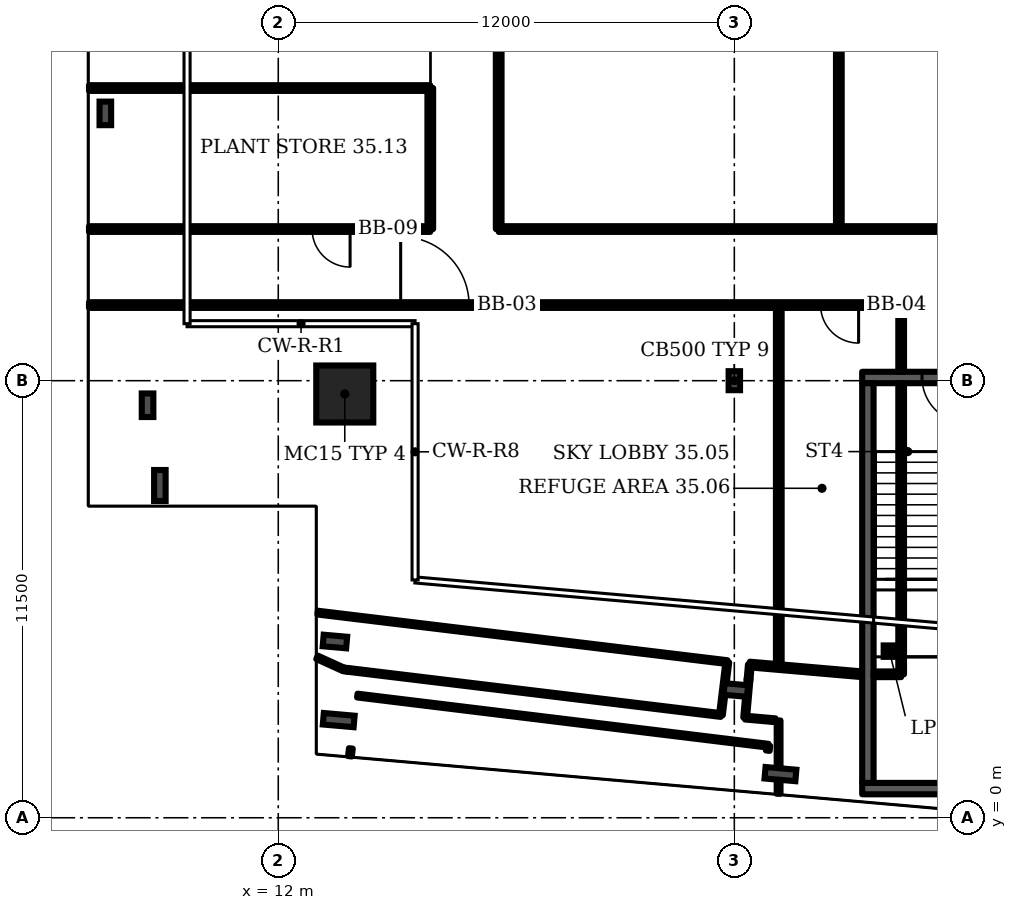
"""IFC4 building model, lengths in metres.
Left out: names, types, materials, properties, quantities, classifications, styles, units other than length and angle.
Written with IfcOpenShell. Run it as: python <this file> out.ifc"""

import sys

from ifc_helpers import new_model, si_unit, direction, frame, frame_2d, origin, origin_2d, place, context, subcontext, project, spatial, rectangle, i_section, extrude, element, fill, save


model = new_model("IFC4")
c1 = context("Model", 3, precision=1e-05, world=origin(), true_north=direction((0.0, 1.0)))
c2 = subcontext(c1, "Body", "Model", "MODEL_VIEW")
j1 = project(units=[si_unit("LENGTHUNIT", "METRE"), si_unit("PLANEANGLEUNIT", "RADIAN")], contexts=[c1])
p1 = place(None, origin())
s1 = spatial("IfcSite", under=j1, at=p1, CompositionType="ELEMENT")
p2 = place(p1, origin())
s2 = spatial("IfcBuilding", under=s1, at=p2, CompositionType="ELEMENT")
p3 = place(p2, frame((0.0, 0.0, 147.1)))
s3 = spatial("IfcBuildingStorey", under=s2, at=p3, CompositionType="ELEMENT", Elevation=147.1)
p4 = place(p3, frame((13.75, 11.15, 0.0), z_axis=(0.0, 0.0, 1.0), x_axis=(1.0, 0.0, 0.0)))
e1 = element("IfcColumn", 1, at=p4, inside=s3, PredefinedType="COLUMN", context=c2, shape_type="SweptSolid", body=[
    extrude(rectangle(XDim=1.5, YDim=1.5, at=origin_2d()), origin(), (0.0, 0.0, 1.0), 4.8),
])
for number, where, z_axis, x_axis in (
    (2, (13.491, 4.637, 0.0), (0.0, 0.0, 1.0), (-0.087, -0.996, 0.0)),
    (3, (24.039, 3.361, 0.0), (0.0, 0.0, 1.0), (-0.087, -0.996, 0.0)),
    (4, (7.45, 18.533, 0.0), (0.0, 0.0, 1.0), (-1.0, 0.0, 0.0)),
    (5, (8.561, 10.854, 0.0), (0.0, 0.0, 1.0), (-1.0, 0.0, 0.0)),
):
    element("IfcColumn", number, at=place(p3, frame(where, z_axis=z_axis, x_axis=x_axis)), inside=s3, PredefinedType="COLUMN", context=c2, shape_type="SweptSolid", body=[
        extrude(i_section(OverallWidth=0.305, OverallDepth=0.62, WebThickness=0.021, FlangeThickness=0.04, FilletRadius=0.027, at=origin_2d()), origin(), (0.0, 0.0, 1.0), 4.8),
    ])
p5 = place(p3, frame((24.0, 11.5, 0.0), z_axis=(0.0, 0.0, 1.0), x_axis=(1.0, 0.0, 0.0)))
e6 = element("IfcColumn", 6, at=p5, inside=s3, PredefinedType="COLUMN", context=c2, shape_type="SweptSolid", body=[
    extrude(i_section(OverallWidth=0.3, OverallDepth=0.5, WebThickness=0.014, FlangeThickness=0.028, FilletRadius=0.027, at=origin_2d()), origin(), (0.0, 0.0, 1.0), 4.8),
])
for number, where, z_axis, x_axis in (
    (7, (13.591, 2.569, 0.0), (0.0, 0.0, 1.0), (-0.087, -0.996, 0.0)),
    (8, (25.214, 1.149, 0.0), (0.0, 0.0, 1.0), (-0.087, -0.996, 0.0)),
    (9, (8.885, 8.743, 0.0), (0.0, 0.0, 1.0), (-1.0, 0.0, 0.0)),
):
    element("IfcColumn", number, at=place(p3, frame(where, z_axis=z_axis, x_axis=x_axis)), inside=s3, PredefinedType="COLUMN", context=c2, shape_type="SweptSolid", body=[
        extrude(i_section(OverallWidth=0.303, OverallDepth=0.814, WebThickness=0.021, FlangeThickness=0.04, FilletRadius=0.03, at=origin_2d()), origin(), (0.0, 0.0, 1.0), 4.8),
    ])
p6 = place(p3, frame((27.364, 11.584, 0.0), z_axis=(0.0, 0.0, 1.0), x_axis=(1.0, 0.0, 0.0)))
e10 = element("IfcWall", 10, at=p6, inside=s3, PredefinedType="SHEAR", context=c2, shape_type="SweptSolid", body=[
    extrude(rectangle(XDim=18.171, YDim=0.3, at=frame_2d((9.085, 0.0))), origin(), (0.0, 0.0, 1.0), 4.4),
])
p7 = place(p6, frame((1.575, 0.0, 0.0)))
e11 = element("IfcOpeningElement", 11, at=p7, cuts=e10, PredefinedType="OPENING", context=c2, shape_type="SweptSolid", body=[
    extrude(rectangle(XDim=1.2, YDim=2.1, at=frame_2d((0.6, 1.05))), frame((0.0, 0.16, 0.0), z_axis=(0.0, -1.0, 0.0), x_axis=(1.0, 0.0, 0.0)), (0.0, 0.0, 1.0), 0.32),
])
p8 = place(p3, frame((7.02, 13.49, 0.0), z_axis=(0.0, 0.0, 1.0), x_axis=(1.0, 0.0, 0.0)))
e12 = element("IfcWall", 12, at=p8, inside=s3, PredefinedType="PARTITIONING", context=c2, shape_type="SweptSolid", body=[
    extrude(rectangle(XDim=21.37, YDim=0.15, at=frame_2d((10.685, 0.0))), origin(), (0.0, 0.0, 1.0), 4.4),
])
p9 = place(p8, frame((8.201, 0.0, 0.0)))
e13 = element("IfcOpeningElement", 13, at=p9, cuts=e12, PredefinedType="OPENING", context=c2, shape_type="SweptSolid", body=[
    extrude(rectangle(XDim=1.8, YDim=2.1, at=frame_2d((0.9, 1.05))), frame((0.0, 0.085, 0.0), z_axis=(0.0, -1.0, 0.0), x_axis=(1.0, 0.0, 0.0)), (0.0, 0.0, 1.0), 0.17),
])
p10 = place(p8, frame((19.25, 0.0, 0.0)))
e14 = element("IfcOpeningElement", 14, at=p10, cuts=e12, PredefinedType="OPENING", context=c2, shape_type="SweptSolid", body=[
    extrude(rectangle(XDim=1.0, YDim=2.1, at=frame_2d((0.5, 1.05))), frame((0.0, 0.085, 0.0), z_axis=(0.0, -1.0, 0.0), x_axis=(1.0, 0.0, 0.0)), (0.0, 0.0, 1.0), 0.17),
])
p11 = place(p3, frame((7.02, 15.49, 0.0), z_axis=(0.0, 0.0, 1.0), x_axis=(1.0, 0.0, 0.0)))
e15 = element("IfcWall", 15, at=p11, inside=s3, PredefinedType="PARTITIONING", context=c2, shape_type="SweptSolid", body=[
    extrude(rectangle(XDim=8.98, YDim=0.15, at=frame_2d((4.49, 0.0))), origin(), (0.0, 0.0, 1.0), 4.4),
])
p12 = place(p11, frame((5.87, 0.0, 0.0)))
e16 = element("IfcOpeningElement", 16, at=p12, cuts=e15, PredefinedType="OPENING", context=c2, shape_type="SweptSolid", body=[
    extrude(rectangle(XDim=1.0, YDim=2.1, at=frame_2d((0.5, 1.05))), frame((0.0, 0.085, 0.0), z_axis=(0.0, -1.0, 0.0), x_axis=(1.0, 0.0, 0.0)), (0.0, 0.0, 1.0), 0.17),
])
p13 = place(p3, frame((7.02, 19.2, 0.0), z_axis=(0.0, 0.0, 1.0), x_axis=(1.0, 0.0, 0.0)))
e17 = element("IfcWall", 17, at=p13, inside=s3, PredefinedType="PARTITIONING", context=c2, shape_type="SweptSolid", body=[
    extrude(rectangle(XDim=8.98, YDim=0.15, at=frame_2d((4.49, 0.0))), origin(), (0.0, 0.0, 1.0), 4.4),
])
p14 = place(p3, frame((13.715, 3.905, 0.0), z_axis=(0.0, 0.0, 1.0), x_axis=(-0.910389, 0.413755, 0.0)))
e18 = element("IfcWall", 18, at=p14, inside=s3, PredefinedType="PARTITIONING", context=c2, shape_type="SweptSolid", body=[
    extrude(rectangle(XDim=0.763, YDim=0.1, at=frame_2d((0.381, 0.0))), origin(), (0.0, 0.0, 1.0), 4.4),
])
p15 = place(p3, frame((13.82, 3.89, 0.0), z_axis=(0.0, 0.0, 1.0), x_axis=(-0.989763, 0.14271, 0.0)))
e19 = element("IfcWall", 19, at=p15, inside=s3, PredefinedType="PARTITIONING", context=c2, shape_type="SweptSolid", body=[
    extrude(rectangle(XDim=0.106, YDim=0.1, at=frame_2d((0.053, 0.0))), origin(), (0.0, 0.0, 1.0), 4.4),
])
p16 = place(p3, frame((13.887, 1.617, 0.0), z_axis=(0.0, 0.0, 1.0), x_axis=(0.109791, 0.993959, 0.0)))
e20 = element("IfcWall", 20, at=p16, inside=s3, PredefinedType="PARTITIONING", context=c2, shape_type="SweptSolid", body=[
    extrude(rectangle(XDim=0.209, YDim=0.1, at=frame_2d((0.104, 0.0))), origin(), (0.0, 0.0, 1.0), 4.4),
])
p17 = place(p3, frame((16.0, 15.49, 0.0), z_axis=(0.0, 0.0, 1.0), x_axis=(0.0, 1.0, 0.0)))
e21 = element("IfcWall", 21, at=p17, inside=s3, PredefinedType="PARTITIONING", context=c2, shape_type="SweptSolid", body=[
    extrude(rectangle(XDim=3.71, YDim=0.15, at=frame_2d((1.855, 0.0))), origin(), (0.0, 0.0, 1.0), 4.4),
])
p18 = place(p3, frame((17.8, 15.49, 0.0), z_axis=(0.0, 0.0, 1.0), x_axis=(0.0, 1.0, 0.0)))
e22 = element("IfcWall", 22, at=p18, inside=s3, PredefinedType="PARTITIONING", context=c2, shape_type="SweptSolid", body=[
    extrude(rectangle(XDim=8.31, YDim=0.15, at=frame_2d((4.155, 0.0))), origin(), (0.0, 0.0, 1.0), 4.4),
])
p19 = place(p3, frame((17.8, 15.49, 0.0), z_axis=(0.0, 0.0, 1.0), x_axis=(1.0, 0.0, 0.0)))
e23 = element("IfcWall", 23, at=p19, inside=s3, PredefinedType="PARTITIONING", context=c2, shape_type="SweptSolid", body=[
    extrude(rectangle(XDim=32.39, YDim=0.15, at=frame_2d((16.195, 0.0))), origin(), (0.0, 0.0, 1.0), 4.4),
])
p20 = place(p3, frame((23.647, 2.703, 0.0), z_axis=(0.0, 0.0, 1.0), x_axis=(-0.99276, 0.120117, 0.0)))
e24 = element("IfcWall", 24, at=p20, inside=s3, PredefinedType="PARTITIONING", context=c2, shape_type="SweptSolid", body=[
    extrude(rectangle(XDim=9.896, YDim=0.1, at=frame_2d((4.948, 0.0))), origin(), (0.0, 0.0, 1.0), 4.4),
])
p21 = place(p3, frame((23.647, 2.703, 0.0), z_axis=(0.0, 0.0, 1.0), x_axis=(0.120149, 0.992755, 0.0)))
e25 = element("IfcWall", 25, at=p21, inside=s3, PredefinedType="PARTITIONING", context=c2, shape_type="SweptSolid", body=[
    extrude(rectangle(XDim=1.4, YDim=0.1, at=frame_2d((0.7, 0.0))), origin(), (0.0, 0.0, 1.0), 4.4),
])
p22 = place(p3, frame((23.815, 4.095, 0.0), z_axis=(0.0, 0.0, 1.0), x_axis=(-0.992778, 0.119977, 0.0)))
e26 = element("IfcWall", 26, at=p22, inside=s3, PredefinedType="PARTITIONING", context=c2, shape_type="SweptSolid", body=[
    extrude(rectangle(XDim=10.858, YDim=0.1, at=frame_2d((5.429, 0.0))), origin(), (0.0, 0.0, 1.0), 4.4),
])
p23 = place(p3, frame((24.285, 2.635, 0.0), z_axis=(0.0, 0.0, 1.0), x_axis=(0.08886, 0.996042, 0.0)))
e27 = element("IfcWall", 27, at=p23, inside=s3, PredefinedType="PARTITIONING", context=c2, shape_type="SweptSolid", body=[
    extrude(rectangle(XDim=1.025, YDim=0.1, at=frame_2d((0.512, 0.0))), origin(), (0.0, 0.0, 1.0), 4.4),
])
p24 = place(p3, frame((24.374, 3.632, 0.0), z_axis=(0.0, 0.0, 1.0), x_axis=(0.087129, 0.996195, 0.0)))
e28 = element("IfcWall", 28, at=p24, inside=s3, PredefinedType="PARTITIONING", context=c2, shape_type="SweptSolid", body=[
    extrude(rectangle(XDim=0.401, YDim=0.1, at=frame_2d((0.2, 0.0))), origin(), (0.0, 0.0, 1.0), 4.4),
])
p25 = place(p3, frame((24.88, 1.765, 0.0), z_axis=(0.0, 0.0, 1.0), x_axis=(0.115544, 0.993306, 0.0)))
e29 = element("IfcWall", 29, at=p25, inside=s3, PredefinedType="PARTITIONING", context=c2, shape_type="SweptSolid", body=[
    extrude(rectangle(XDim=0.131, YDim=0.1, at=frame_2d((0.065, 0.0))), origin(), (0.0, 0.0, 1.0), 4.4),
])
p26 = place(p3, frame((24.895, 1.895, 0.0), z_axis=(0.0, 0.0, 1.0), x_axis=(-0.992629, 0.12116, 0.0)))
e30 = element("IfcWall", 30, at=p26, inside=s3, PredefinedType="PARTITIONING", context=c2, shape_type="SweptSolid", body=[
    extrude(rectangle(XDim=10.895, YDim=0.1, at=frame_2d((5.448, 0.0))), origin(), (0.0, 0.0, 1.0), 4.4),
])
p27 = place(p3, frame((25.08, 2.565, 0.0), z_axis=(0.0, 0.0, 1.0), x_axis=(-0.996143, 0.087778, 0.0)))
e31 = element("IfcWall", 31, at=p27, inside=s3, PredefinedType="PARTITIONING", context=c2, shape_type="SweptSolid", body=[
    extrude(rectangle(XDim=0.798, YDim=0.1, at=frame_2d((0.399, 0.0))), origin(), (0.0, 0.0, 1.0), 4.4),
])
p28 = place(p3, frame((25.165, 0.631, 0.0), z_axis=(0.0, 0.0, 1.0), x_axis=(0.0, 1.0, 0.0)))
e32 = element("IfcWall", 32, at=p28, inside=s3, PredefinedType="PARTITIONING", context=c2, shape_type="SweptSolid", body=[
    extrude(rectangle(XDim=1.929, YDim=0.1, at=frame_2d((0.964, 0.0))), origin(), (0.0, 0.0, 1.0), 4.4),
])
p29 = place(p3, frame((25.17, 3.965, 0.0), z_axis=(0.0, 0.0, 1.0), x_axis=(0.0, 1.0, 0.0)))
e33 = element("IfcWall", 33, at=p29, inside=s3, PredefinedType="PARTITIONING", context=c2, shape_type="SweptSolid", body=[
    extrude(rectangle(XDim=9.525, YDim=0.15, at=frame_2d((4.762, 0.0))), origin(), (0.0, 0.0, 1.0), 4.4),
])
p30 = place(p3, frame((26.75, 15.49, 0.0), z_axis=(0.0, 0.0, 1.0), x_axis=(0.0, 1.0, 0.0)))
e34 = element("IfcWall", 34, at=p30, inside=s3, PredefinedType="PARTITIONING", context=c2, shape_type="SweptSolid", body=[
    extrude(rectangle(XDim=15.01, YDim=0.15, at=frame_2d((7.505, 0.0))), origin(), (0.0, 0.0, 1.0), 4.4),
])
p31 = place(p3, frame((27.344, 3.777, 0.0), z_axis=(0.0, 0.0, 1.0), x_axis=(-0.996272, 0.086262, 0.0)))
e35 = element("IfcWall", 35, at=p31, inside=s3, PredefinedType="PARTITIONING", context=c2, shape_type="SweptSolid", body=[
    extrude(rectangle(XDim=2.952, YDim=0.15, at=frame_2d((1.476, 0.0))), origin(), (0.0, 0.0, 1.0), 4.4),
])
p32 = place(p3, frame((27.664, 3.775, 0.0), z_axis=(0.0, 0.0, 1.0), x_axis=(1.0, 0.0, 0.0)))
e36 = element("IfcWall", 36, at=p32, inside=s3, PredefinedType="PARTITIONING", context=c2, shape_type="SweptSolid", body=[
    extrude(rectangle(XDim=0.726, YDim=0.15, at=frame_2d((0.363, 0.0))), origin(), (0.0, 0.0, 1.0), 4.4),
])
p33 = place(p3, frame((28.39, 3.775, 0.0), z_axis=(0.0, 0.0, 1.0), x_axis=(0.0, 1.0, 0.0)))
e37 = element("IfcWall", 37, at=p33, inside=s3, PredefinedType="PARTITIONING", context=c2, shape_type="SweptSolid", body=[
    extrude(rectangle(XDim=7.659, YDim=0.15, at=frame_2d((3.83, 0.0))), origin(), (0.0, 0.0, 1.0), 4.4),
])
p34 = place(p3, frame((28.39, 11.734, 0.0), z_axis=(0.0, 0.0, 1.0), x_axis=(0.0, 1.0, 0.0)))
e38 = element("IfcWall", 38, at=p34, inside=s3, PredefinedType="PARTITIONING", context=c2, shape_type="SweptSolid", body=[
    extrude(rectangle(XDim=1.756, YDim=0.15, at=frame_2d((0.878, 0.0))), origin(), (0.0, 0.0, 1.0), 4.4),
])
p35 = place(p3, frame((27.364, 0.767, 0.0), z_axis=(0.0, 0.0, 1.0), x_axis=(1.0, 0.0, 0.0)))
e39 = element("IfcWall", 39, at=p35, inside=s3, PredefinedType="SHEAR", context=c2, shape_type="SweptSolid", body=[
    extrude(rectangle(XDim=18.171, YDim=0.3, at=frame_2d((9.085, 0.0))), origin(), (0.0, 0.0, 1.0), 4.4),
])
p36 = place(p3, frame((27.514, 0.917, 0.0), z_axis=(0.0, 0.0, 1.0), x_axis=(0.0, 1.0, 0.0)))
e40 = element("IfcWall", 40, at=p36, inside=s3, PredefinedType="SHEAR", context=c2, shape_type="SweptSolid", body=[
    extrude(rectangle(XDim=10.517, YDim=0.3, at=frame_2d((5.259, 0.0))), origin(), (0.0, 0.0, 1.0), 4.4),
])
p37 = place(p3, frame((28.08, 4.384, 0.0), z_axis=(0.0, 0.0, 1.0), x_axis=(1.0, 0.0, 0.0)))
e41 = element("IfcColumn", 41, at=p37, inside=s3, PredefinedType="COLUMN", context=c2, shape_type="SweptSolid", body=[
    extrude(rectangle(XDim=0.3, YDim=0.3, at=origin_2d()), origin(), (0.0, 0.0, 1.0), 2.2),
])
p38 = place(p7, origin())
e42 = element("IfcDoor", 42, at=p38, inside=s3, OperationType="SINGLE_SWING_RIGHT", PredefinedType="DOOR", context=c2, shape_type="SweptSolid", body=[
    extrude(rectangle(XDim=1.2, YDim=2.1, at=frame_2d((0.6, 1.05))), frame((0.0, 0.025, 0.0), z_axis=(0.0, -1.0, 0.0), x_axis=(1.0, 0.0, 0.0)), (0.0, 0.0, 1.0), 0.05),
])
fill(e11, e42)
p39 = place(p9, origin())
e43 = element("IfcDoor", 43, at=p39, inside=s3, OperationType="DOUBLE_DOOR_SINGLE_SWING", PredefinedType="DOOR", context=c2, shape_type="SweptSolid", body=[
    extrude(rectangle(XDim=1.8, YDim=2.1, at=frame_2d((0.9, 1.05))), frame((0.0, 0.025, 0.0), z_axis=(0.0, -1.0, 0.0), x_axis=(1.0, 0.0, 0.0)), (0.0, 0.0, 1.0), 0.05),
])
fill(e13, e43)
p40 = place(p10, origin())
e44 = element("IfcDoor", 44, at=p40, inside=s3, OperationType="SINGLE_SWING_RIGHT", PredefinedType="DOOR", context=c2, shape_type="SweptSolid", body=[
    extrude(rectangle(XDim=1.0, YDim=2.1, at=frame_2d((0.5, 1.05))), frame((0.0, 0.025, 0.0), z_axis=(0.0, -1.0, 0.0), x_axis=(1.0, 0.0, 0.0)), (0.0, 0.0, 1.0), 0.05),
])
fill(e14, e44)
p41 = place(p12, origin())
e45 = element("IfcDoor", 45, at=p41, inside=s3, OperationType="SINGLE_SWING_RIGHT", PredefinedType="DOOR", context=c2, shape_type="SweptSolid", body=[
    extrude(rectangle(XDim=1.0, YDim=2.1, at=frame_2d((0.5, 1.05))), frame((0.0, 0.025, 0.0), z_axis=(0.0, -1.0, 0.0), x_axis=(1.0, 0.0, 0.0)), (0.0, 0.0, 1.0), 0.05),
])
fill(e16, e45)
save(model, sys.argv[1])
